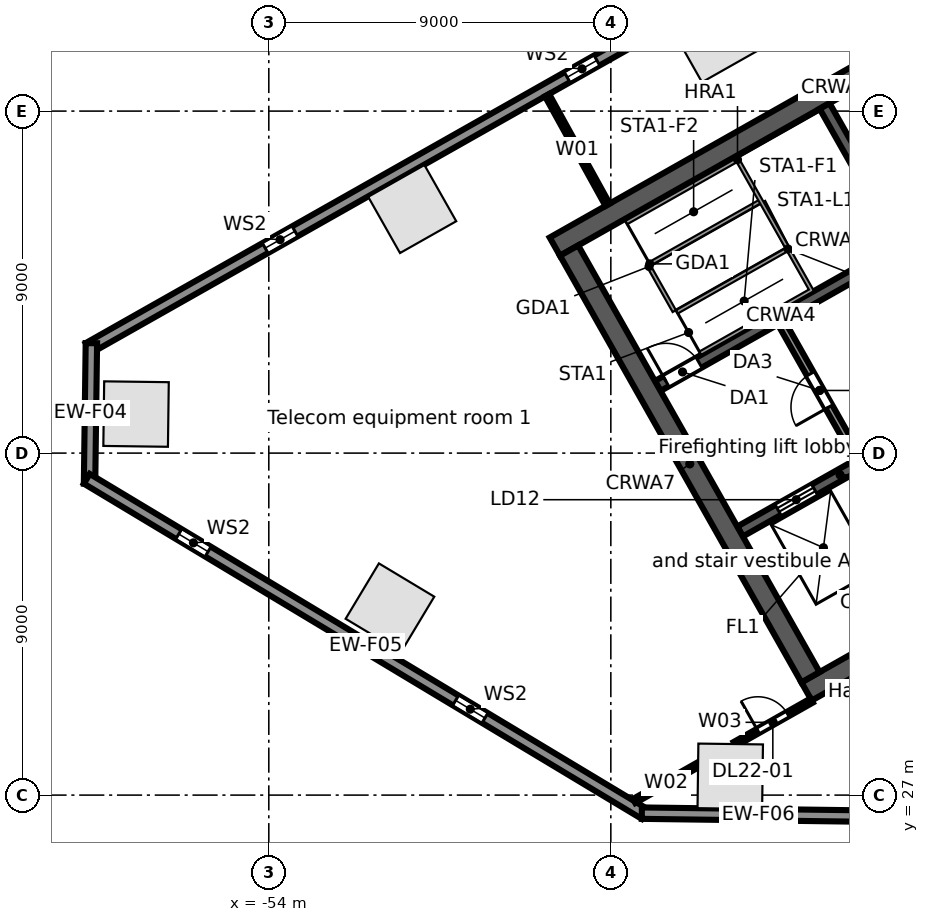
"""IFC4 building model, lengths in metres.
Left out: names, types, materials, properties, quantities, classifications, styles, units other than length and angle.
Written with IfcOpenShell. Run it as: python <this file> out.ifc"""

import sys

from ifc_helpers import new_model, si_unit, direction, frame, frame_2d, origin, origin_2d, place, context, subcontext, project, spatial, rectangle, extrude, element, fill, save


model = new_model("IFC4")
c1 = context("Model", 3, precision=1e-05, world=origin(), true_north=direction((0.0, 1.0)))
c2 = subcontext(c1, "Body", "Model", "MODEL_VIEW")
j1 = project(units=[si_unit("LENGTHUNIT", "METRE"), si_unit("PLANEANGLEUNIT", "RADIAN")], contexts=[c1])
p1 = place(None, origin())
s1 = spatial("IfcSite", under=j1, at=p1, CompositionType="ELEMENT")
p2 = place(p1, origin())
s2 = spatial("IfcBuilding", under=s1, at=p2, CompositionType="ELEMENT")
p3 = place(p2, frame((0.0, 0.0, 110.3)))
s3 = spatial("IfcBuildingStorey", under=s2, at=p3, CompositionType="ELEMENT", Elevation=110.3)
for number, where, z_axis, x_axis in (
    (1, (-42.28, 46.919, 0.0), (0.0, 0.0, 1.0), (-0.87, -0.492, 0.0)),
    (2, (-50.226, 42.423, 0.0), (0.0, 0.0, 1.0), (-0.87, -0.492, 0.0)),
    (3, (-57.493, 37.027, 0.0), (0.0, 0.0, 1.0), (-0.013, -1.0, 0.0)),
    (4, (-50.812, 31.931, 0.0), (0.0, 0.0, 1.0), (0.857, -0.515, 0.0)),
    (5, (-41.858, 27.495, 0.0), (0.0, 0.0, 1.0), (1.0, -0.013, 0.0)),
):
    element("IfcColumn", number, at=place(p3, frame(where, z_axis=z_axis, x_axis=x_axis)), inside=s3, PredefinedType="COLUMN", context=c2, shape_type="SweptSolid", body=[
        extrude(rectangle(XDim=1.7, YDim=1.7, at=origin_2d()), origin(), (0.0, 0.0, 1.0), 4.4),
    ])
p4 = place(p3, frame((-58.745, 38.764, 0.0), z_axis=(0.0, 0.0, 1.0), x_axis=(0.870355811726, 0.492423355453, 0.0)))
e6 = element("IfcWall", 6, at=p4, inside=s3, PredefinedType="STANDARD", context=c2, shape_type="SweptSolid", body=[
    extrude(rectangle(XDim=64.025, YDim=0.3, at=frame_2d((32.013, 0.0))), origin(), (0.0, 0.0, 1.0), 4.08),
])
p5 = place(p4, frame((60.122, 0.0, 0.6)))
e7 = element("IfcOpeningElement", 7, at=p5, cuts=e6, PredefinedType="OPENING", context=c2, shape_type="SweptSolid", body=[
    extrude(rectangle(XDim=0.9, YDim=2.8, at=frame_2d((0.45, 1.4))), frame((0.0, 0.16, 0.0), z_axis=(0.0, -1.0, 0.0), x_axis=(1.0, 0.0, 0.0)), (0.0, 0.0, 1.0), 0.32),
])
p6 = place(p4, frame((50.992, 0.0, 0.6)))
e8 = element("IfcOpeningElement", 8, at=p6, cuts=e6, PredefinedType="OPENING", context=c2, shape_type="SweptSolid", body=[
    extrude(rectangle(XDim=0.9, YDim=2.8, at=frame_2d((0.45, 1.4))), frame((0.0, 0.16, 0.0), z_axis=(0.0, -1.0, 0.0), x_axis=(1.0, 0.0, 0.0)), (0.0, 0.0, 1.0), 0.32),
])
p7 = place(p4, frame((41.862, 0.0, 0.6)))
e9 = element("IfcOpeningElement", 9, at=p7, cuts=e6, PredefinedType="OPENING", context=c2, shape_type="SweptSolid", body=[
    extrude(rectangle(XDim=0.9, YDim=2.8, at=frame_2d((0.45, 1.4))), frame((0.0, 0.16, 0.0), z_axis=(0.0, -1.0, 0.0), x_axis=(1.0, 0.0, 0.0)), (0.0, 0.0, 1.0), 0.32),
])
p8 = place(p4, frame((32.732, 0.0, 0.6)))
e10 = element("IfcOpeningElement", 10, at=p8, cuts=e6, PredefinedType="OPENING", context=c2, shape_type="SweptSolid", body=[
    extrude(rectangle(XDim=0.9, YDim=2.8, at=frame_2d((0.45, 1.4))), frame((0.0, 0.16, 0.0), z_axis=(0.0, -1.0, 0.0), x_axis=(1.0, 0.0, 0.0)), (0.0, 0.0, 1.0), 0.32),
])
p9 = place(p4, frame((23.602, 0.0, 0.6)))
e11 = element("IfcOpeningElement", 11, at=p9, cuts=e6, PredefinedType="OPENING", context=c2, shape_type="SweptSolid", body=[
    extrude(rectangle(XDim=0.9, YDim=2.8, at=frame_2d((0.45, 1.4))), frame((0.0, 0.16, 0.0), z_axis=(0.0, -1.0, 0.0), x_axis=(1.0, 0.0, 0.0)), (0.0, 0.0, 1.0), 0.32),
])
p10 = place(p4, frame((14.472, 0.0, 0.6)))
e12 = element("IfcOpeningElement", 12, at=p10, cuts=e6, PredefinedType="OPENING", context=c2, shape_type="SweptSolid", body=[
    extrude(rectangle(XDim=0.9, YDim=2.8, at=frame_2d((0.45, 1.4))), frame((0.0, 0.16, 0.0), z_axis=(0.0, -1.0, 0.0), x_axis=(1.0, 0.0, 0.0)), (0.0, 0.0, 1.0), 0.32),
])
p11 = place(p4, frame((5.342, 0.0, 0.6)))
e13 = element("IfcOpeningElement", 13, at=p11, cuts=e6, PredefinedType="OPENING", context=c2, shape_type="SweptSolid", body=[
    extrude(rectangle(XDim=0.9, YDim=2.8, at=frame_2d((0.45, 1.4))), frame((0.0, 0.16, 0.0), z_axis=(0.0, -1.0, 0.0), x_axis=(1.0, 0.0, 0.0)), (0.0, 0.0, 1.0), 0.32),
])
p12 = place(p3, frame((-58.717, 35.194, 0.0), z_axis=(0.0, 0.0, 1.0), x_axis=(0.013069053407, 0.999914596275, 0.0)))
e14 = element("IfcWall", 14, at=p12, inside=s3, PredefinedType="STANDARD", context=c2, shape_type="SweptSolid", body=[
    extrude(rectangle(XDim=3.699, YDim=0.3, at=frame_2d((1.849, 0.0))), origin(), (0.0, 0.0, 1.0), 4.08),
])
p13 = place(p3, frame((-44.109, 26.504, 0.0), z_axis=(0.0, 0.0, 1.0), x_axis=(-0.857169502585, 0.515034410344, 0.0)))
e15 = element("IfcWall", 15, at=p13, inside=s3, PredefinedType="STANDARD", context=c2, shape_type="SweptSolid", body=[
    extrude(rectangle(XDim=17.127, YDim=0.3, at=frame_2d((8.563, 0.0))), origin(), (0.0, 0.0, 1.0), 4.08),
])
p14 = place(p13, frame((13.403, 0.0, 0.6)))
e16 = element("IfcOpeningElement", 16, at=p14, cuts=e15, PredefinedType="OPENING", context=c2, shape_type="SweptSolid", body=[
    extrude(rectangle(XDim=0.9, YDim=2.8, at=frame_2d((0.45, 1.4))), frame((0.0, 0.16, 0.0), z_axis=(0.0, -1.0, 0.0), x_axis=(1.0, 0.0, 0.0)), (0.0, 0.0, 1.0), 0.32),
])
p15 = place(p13, frame((4.903, 0.0, 0.6)))
e17 = element("IfcOpeningElement", 17, at=p15, cuts=e15, PredefinedType="OPENING", context=c2, shape_type="SweptSolid", body=[
    extrude(rectangle(XDim=0.9, YDim=2.8, at=frame_2d((0.45, 1.4))), frame((0.0, 0.16, 0.0), z_axis=(0.0, -1.0, 0.0), x_axis=(1.0, 0.0, 0.0)), (0.0, 0.0, 1.0), 0.32),
])
p16 = place(p3, frame((-38.057, 26.445, 0.0), z_axis=(0.0, 0.0, 1.0), x_axis=(-0.999914086342, 0.013108010296, 0.0)))
e18 = element("IfcWall", 18, at=p16, inside=s3, PredefinedType="STANDARD", context=c2, shape_type="SweptSolid", body=[
    extrude(rectangle(XDim=6.128, YDim=0.3, at=frame_2d((3.064, 0.0))), origin(), (0.0, 0.0, 1.0), 4.08),
])
p17 = place(p3, frame((-39.85, 29.727, 0.0), z_axis=(0.0, 0.0, 1.0), x_axis=(0.870359753402, 0.492416388494, 0.0)))
e19 = element("IfcWall", 19, at=p17, inside=s3, PredefinedType="SOLIDWALL", context=c2, shape_type="SweptSolid", body=[
    extrude(rectangle(XDim=17.0, YDim=0.55, at=frame_2d((8.5, 0.0))), origin(), (0.0, 0.0, 1.0), 4.08),
])
p18 = place(p17, frame((7.2, 0.0, 0.0)))
e20 = element("IfcOpeningElement", 20, at=p18, cuts=e19, PredefinedType="OPENING", context=c2, shape_type="SweptSolid", body=[
    extrude(rectangle(XDim=1.2, YDim=2.1, at=frame_2d((0.6, 1.05))), frame((0.0, 0.285, 0.0), z_axis=(0.0, -1.0, 0.0), x_axis=(1.0, 0.0, 0.0)), (0.0, 0.0, 1.0), 0.57),
])
p19 = place(p3, frame((-41.6, 33.936, 0.0), z_axis=(0.0, 0.0, 1.0), x_axis=(0.870348557882, 0.492436176365, 0.0)))
e21 = element("IfcWall", 21, at=p19, inside=s3, PredefinedType="SOLIDWALL", context=c2, shape_type="SweptSolid", body=[
    extrude(rectangle(XDim=6.05, YDim=0.3, at=frame_2d((3.025, 0.0))), origin(), (0.0, 0.0, 1.0), 4.08),
])
p20 = place(p19, frame((1.15, 0.0, 0.0)))
e22 = element("IfcOpeningElement", 22, at=p20, cuts=e21, PredefinedType="OPENING", context=c2, shape_type="SweptSolid", body=[
    extrude(rectangle(XDim=1.1, YDim=2.1, at=frame_2d((0.55, 1.05))), frame((0.0, 0.16, 0.0), z_axis=(0.0, -1.0, 0.0), x_axis=(1.0, 0.0, 0.0)), (0.0, 0.0, 1.0), 0.32),
])
p21 = place(p19, frame((4.3, 0.0, 0.0)))
e23 = element("IfcOpeningElement", 23, at=p21, cuts=e21, PredefinedType="OPENING", context=c2, shape_type="SweptSolid", body=[
    extrude(rectangle(XDim=1.1, YDim=2.1, at=frame_2d((0.55, 1.05))), frame((0.0, 0.16, 0.0), z_axis=(0.0, -1.0, 0.0), x_axis=(1.0, 0.0, 0.0)), (0.0, 0.0, 1.0), 0.32),
])
p22 = place(p3, frame((-43.766, 37.766, 0.0), z_axis=(0.0, 0.0, 1.0), x_axis=(0.870346696097, 0.492439466932, 0.0)))
e24 = element("IfcWall", 24, at=p22, inside=s3, PredefinedType="SOLIDWALL", context=c2, shape_type="SweptSolid", body=[
    extrude(rectangle(XDim=7.45, YDim=0.3, at=frame_2d((3.725, 0.0))), origin(), (0.0, 0.0, 1.0), 4.08),
])
p23 = place(p22, frame((0.25, 0.0, 0.0)))
e25 = element("IfcOpeningElement", 25, at=p23, cuts=e24, PredefinedType="OPENING", context=c2, shape_type="SweptSolid", body=[
    extrude(rectangle(XDim=1.0, YDim=2.1, at=frame_2d((0.5, 1.05))), frame((0.0, 0.16, 0.0), z_axis=(0.0, -1.0, 0.0), x_axis=(1.0, 0.0, 0.0)), (0.0, 0.0, 1.0), 0.32),
])
p24 = place(p3, frame((-46.473, 41.434, 0.0), z_axis=(0.0, 0.0, 1.0), x_axis=(0.870359753402, 0.492416388494, 0.0)))
e26 = element("IfcWall", 26, at=p24, inside=s3, PredefinedType="SOLIDWALL", context=c2, shape_type="SweptSolid", body=[
    extrude(rectangle(XDim=17.0, YDim=0.55, at=frame_2d((8.5, 0.0))), origin(), (0.0, 0.0, 1.0), 4.08),
])
p25 = place(p3, frame((-46.098, 41.33, 0.0), z_axis=(0.0, 0.0, 1.0), x_axis=(0.492418910884, -0.870358326325, 0.0)))
e27 = element("IfcWall", 27, at=p25, inside=s3, PredefinedType="SOLIDWALL", context=c2, shape_type="SweptSolid", body=[
    extrude(rectangle(XDim=12.9, YDim=0.55, at=frame_2d((6.45, 0.0))), origin(), (0.0, 0.0, 1.0), 4.08),
])
p26 = place(p3, frame((-40.516, 39.433, 0.0), z_axis=(0.0, 0.0, 1.0), x_axis=(0.492453559952, -0.87033872216, 0.0)))
e28 = element("IfcWall", 28, at=p26, inside=s3, PredefinedType="PARTITIONING", context=c2, shape_type="SweptSolid", body=[
    extrude(rectangle(XDim=4.1, YDim=0.2, at=frame_2d((2.05, 0.0))), origin(), (0.0, 0.0, 1.0), 4.08),
])
p27 = place(p26, frame((1.55, 0.0, 0.0)))
e29 = element("IfcOpeningElement", 29, at=p27, cuts=e28, PredefinedType="OPENING", context=c2, shape_type="SweptSolid", body=[
    extrude(rectangle(XDim=1.0, YDim=2.1, at=frame_2d((0.5, 1.05))), frame((0.0, 0.11, 0.0), z_axis=(0.0, -1.0, 0.0), x_axis=(1.0, 0.0, 0.0)), (0.0, 0.0, 1.0), 0.22),
])
p28 = place(p3, frame((-39.375, 45.134, 0.0), z_axis=(0.0, 0.0, 1.0), x_axis=(0.492428039142, -0.870353161807, 0.0)))
e30 = element("IfcWall", 30, at=p28, inside=s3, PredefinedType="SOLIDWALL", context=c2, shape_type="SweptSolid", body=[
    extrude(rectangle(XDim=4.1, YDim=0.3, at=frame_2d((2.05, 0.0))), origin(), (0.0, 0.0, 1.0), 4.08),
])
p29 = place(p3, frame((-46.678, 45.419, 0.0), z_axis=(0.0, 0.0, 1.0), x_axis=(0.483275206546, -0.875468488718, 0.0)))
e31 = element("IfcWall", 31, at=p29, inside=s3, PredefinedType="PARTITIONING", context=c2, shape_type="SweptSolid", body=[
    extrude(rectangle(XDim=3.294, YDim=0.125, at=frame_2d((1.647, 0.0))), origin(), (0.0, 0.0, 1.0), 3.36),
])
p30 = place(p3, frame((-44.386, 26.845, 0.0), z_axis=(0.0, 0.0, 1.0), x_axis=(0.870226201187, 0.492652371118, 0.0)))
e32 = element("IfcWall", 32, at=p30, inside=s3, PredefinedType="PARTITIONING", context=c2, shape_type="SweptSolid", body=[
    extrude(rectangle(XDim=1.933, YDim=0.125, at=frame_2d((0.966, 0.0))), origin(), (0.0, 0.0, 1.0), 4.08),
])
p31 = place(p3, frame((-41.738, 28.343, 0.0), z_axis=(0.0, 0.0, 1.0), x_axis=(0.870265350095, 0.492583211676, 0.0)))
e33 = element("IfcWall", 33, at=p31, inside=s3, PredefinedType="PARTITIONING", context=c2, shape_type="SweptSolid", body=[
    extrude(rectangle(XDim=2.324, YDim=0.125, at=frame_2d((1.162, 0.0))), origin(), (0.0, 0.0, 1.0), 4.08),
])
p32 = place(p31, frame((0.7, 0.0, 0.0)))
e34 = element("IfcOpeningElement", 34, at=p32, cuts=e33, PredefinedType="OPENING", context=c2, shape_type="SweptSolid", body=[
    extrude(rectangle(XDim=0.9, YDim=2.1, at=frame_2d((0.45, 1.05))), frame((0.0, 0.073, 0.0), z_axis=(0.0, -1.0, 0.0), x_axis=(1.0, 0.0, 0.0)), (0.0, 0.0, 1.0), 0.145),
])
p33 = place(p10, origin())
e35 = element("IfcWindow", 35, at=p33, inside=s3, PartitioningType="SINGLE_PANEL", PredefinedType="WINDOW", context=c2, shape_type="SweptSolid", body=[
    extrude(rectangle(XDim=0.9, YDim=2.8, at=frame_2d((0.45, 1.4))), frame((0.0, 0.03, 0.0), z_axis=(0.0, -1.0, 0.0), x_axis=(1.0, 0.0, 0.0)), (0.0, 0.0, 1.0), 0.06),
])
fill(e12, e35)
p34 = place(p11, origin())
e36 = element("IfcWindow", 36, at=p34, inside=s3, PartitioningType="SINGLE_PANEL", PredefinedType="WINDOW", context=c2, shape_type="SweptSolid", body=[
    extrude(rectangle(XDim=0.9, YDim=2.8, at=frame_2d((0.45, 1.4))), frame((0.0, 0.03, 0.0), z_axis=(0.0, -1.0, 0.0), x_axis=(1.0, 0.0, 0.0)), (0.0, 0.0, 1.0), 0.06),
])
fill(e13, e36)
p35 = place(p14, origin())
e37 = element("IfcWindow", 37, at=p35, inside=s3, PartitioningType="SINGLE_PANEL", PredefinedType="WINDOW", context=c2, shape_type="SweptSolid", body=[
    extrude(rectangle(XDim=0.9, YDim=2.8, at=frame_2d((0.45, 1.4))), frame((0.0, 0.03, 0.0), z_axis=(0.0, -1.0, 0.0), x_axis=(1.0, 0.0, 0.0)), (0.0, 0.0, 1.0), 0.06),
])
fill(e16, e37)
p36 = place(p15, origin())
e38 = element("IfcWindow", 38, at=p36, inside=s3, PartitioningType="SINGLE_PANEL", PredefinedType="WINDOW", context=c2, shape_type="SweptSolid", body=[
    extrude(rectangle(XDim=0.9, YDim=2.8, at=frame_2d((0.45, 1.4))), frame((0.0, 0.03, 0.0), z_axis=(0.0, -1.0, 0.0), x_axis=(1.0, 0.0, 0.0)), (0.0, 0.0, 1.0), 0.06),
])
fill(e17, e38)
p37 = place(p20, origin())
e39 = element("IfcDoor", 39, at=p37, inside=s3, OperationType="DOUBLE_DOOR_SLIDING", PredefinedType="DOOR", context=c2, shape_type="SweptSolid", body=[
    extrude(rectangle(XDim=1.1, YDim=2.1, at=frame_2d((0.55, 1.05))), frame((0.0, 0.025, 0.0), z_axis=(0.0, -1.0, 0.0), x_axis=(1.0, 0.0, 0.0)), (0.0, 0.0, 1.0), 0.05),
])
fill(e22, e39)
p38 = place(p23, origin())
e40 = element("IfcDoor", 40, at=p38, inside=s3, OperationType="SINGLE_SWING_LEFT", PredefinedType="DOOR", context=c2, shape_type="SweptSolid", body=[
    extrude(rectangle(XDim=1.0, YDim=2.1, at=frame_2d((0.5, 1.05))), frame((0.0, 0.025, 0.0), z_axis=(0.0, -1.0, 0.0), x_axis=(1.0, 0.0, 0.0)), (0.0, 0.0, 1.0), 0.05),
])
fill(e25, e40)
p39 = place(p27, frame((1.0, 0.0, 0.0), z_axis=(0.0, 0.0, 1.0), x_axis=(-1.0, 0.0, 0.0)))
e41 = element("IfcDoor", 41, at=p39, inside=s3, OperationType="SINGLE_SWING_LEFT", PredefinedType="DOOR", context=c2, shape_type="SweptSolid", body=[
    extrude(rectangle(XDim=1.0, YDim=2.1, at=frame_2d((0.5, 1.05))), frame((0.0, 0.025, 0.0), z_axis=(0.0, -1.0, 0.0), x_axis=(1.0, 0.0, 0.0)), (0.0, 0.0, 1.0), 0.05),
])
fill(e29, e41)
p40 = place(p32, origin())
e42 = element("IfcDoor", 42, at=p40, inside=s3, OperationType="SINGLE_SWING_LEFT", PredefinedType="DOOR", context=c2, shape_type="SweptSolid", body=[
    extrude(rectangle(XDim=0.9, YDim=2.1, at=frame_2d((0.45, 1.05))), frame((0.0, 0.025, 0.0), z_axis=(0.0, -1.0, 0.0), x_axis=(1.0, 0.0, 0.0)), (0.0, 0.0, 1.0), 0.05),
])
fill(e34, e42)
save(model, sys.argv[1])
